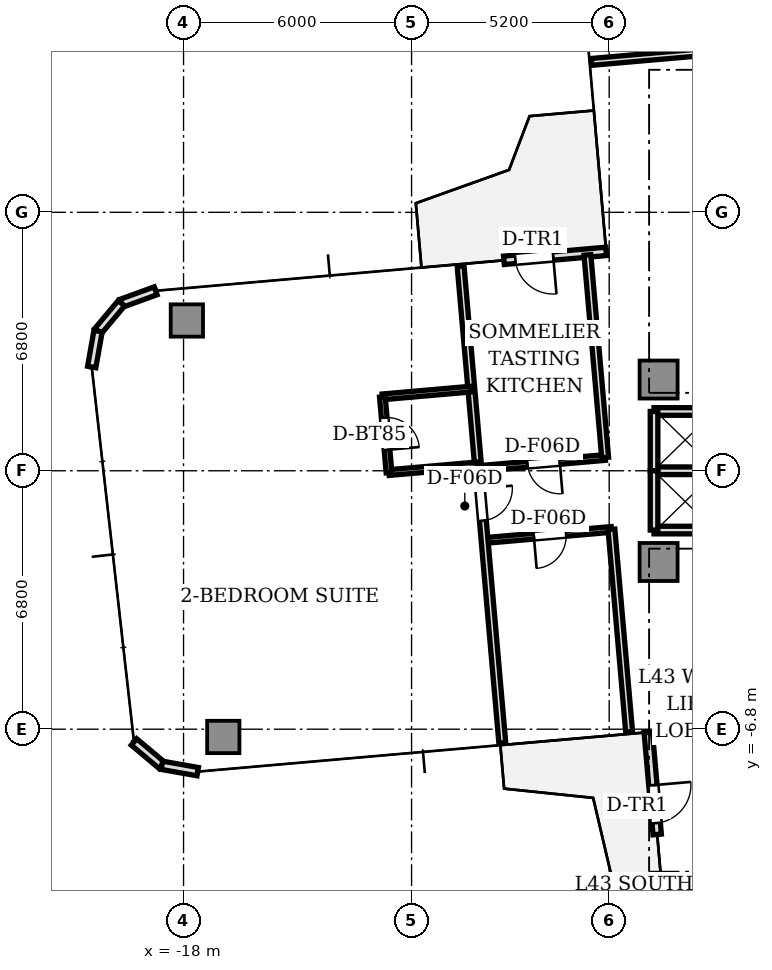
"""IFC4 building model, lengths in metres.
Left out: names, types, materials, properties, quantities, classifications, styles, units other than length and angle.
Written with IfcOpenShell. Run it as: python <this file> out.ifc"""

import sys

from ifc_helpers import new_model, si_unit, direction, frame, frame_2d, origin, origin_2d, place, context, subcontext, project, spatial, rectangle, extrude, source, transform, mapped, element, fill, save


model = new_model("IFC4")
c1 = context("Model", 3, precision=1e-05, world=origin(), true_north=direction((0.0, 1.0)))
c2 = subcontext(c1, "Body", "Model", "MODEL_VIEW")
j1 = project(units=[si_unit("LENGTHUNIT", "METRE"), si_unit("PLANEANGLEUNIT", "RADIAN")], contexts=[c1])
p1 = place(None, origin())
s1 = spatial("IfcSite", under=j1, at=p1, CompositionType="ELEMENT")
p2 = place(p1, origin())
s2 = spatial("IfcBuilding", under=s1, at=p2, CompositionType="ELEMENT")
p3 = place(p2, frame((0.0, 0.0, 157.3)))
s3 = spatial("IfcBuildingStorey", under=s2, at=p3, CompositionType="ELEMENT", Elevation=157.3)
m1 = source(origin(), c2, "Body", "SweptSolid", [
    extrude(rectangle(XDim=1.0, YDim=1.0, at=origin_2d()), origin(), (0.0, 0.0, 1.0), 3.11),
])
for number, where, z_axis, x_axis in (
    (1, (-5.5, 2.4, 0.0), (0.0, 0.0, 1.0), (1.0, 0.0, 0.0)),
    (2, (-5.5, -2.4, 0.0), (0.0, 0.0, 1.0), (1.0, 0.0, 0.0)),
):
    element("IfcColumn", number, at=place(p3, frame(where, z_axis=z_axis, x_axis=x_axis)), inside=s3, PredefinedType="COLUMN", context=c2, shape_type="MappedRepresentation", body=[
        mapped(m1, transform((0.0, 0.0, 0.0), scale=1.0)),
    ])
m2 = source(origin(), c2, "Body", "SweptSolid", [
    extrude(rectangle(XDim=0.85, YDim=0.85, at=origin_2d()), origin(), (0.0, 0.0, 1.0), 3.11),
])
for number, where, z_axis, x_axis in (
    (3, (-17.913, 3.954, 0.0), (0.0, 0.0, 1.0), (1.0, 0.0, 0.0)),
    (4, (-16.954, -7.004, 0.0), (0.0, 0.0, 1.0), (1.0, 0.0, 0.0)),
):
    element("IfcColumn", number, at=place(p3, frame(where, z_axis=z_axis, x_axis=x_axis)), inside=s3, PredefinedType="COLUMN", context=c2, shape_type="MappedRepresentation", body=[
        mapped(m2, transform((0.0, 0.0, 0.0), scale=1.0)),
    ])
p4 = place(p3, frame((-6.879, 5.772, 0.0), z_axis=(0.0, 0.0, 1.0), x_axis=(-0.996193619346, -0.087168071984, 0.0)))
e5 = element("IfcWall", 5, at=p4, inside=s3, PredefinedType="STANDARD", context=c2, shape_type="SweptSolid", body=[
    extrude(rectangle(XDim=2.7, YDim=0.22, at=frame_2d((1.35, 0.0))), origin(), (0.0, 0.0, 1.0), 3.11),
])
p5 = place(p4, frame((1.4, 0.0, 0.0)))
e6 = element("IfcOpeningElement", 6, at=p5, cuts=e5, PredefinedType="OPENING", context=c2, shape_type="SweptSolid", body=[
    extrude(rectangle(XDim=1.0, YDim=2.2, at=frame_2d((0.5, 1.1))), frame((0.0, 0.12, 0.0), z_axis=(0.0, -1.0, 0.0), x_axis=(1.0, 0.0, 0.0)), (0.0, 0.0, 1.0), 0.24),
])
p6 = place(p3, frame((-18.734, 4.735, 0.0), z_axis=(0.0, 0.0, 1.0), x_axis=(-0.939741306239, -0.34188635151, 0.0)))
e7 = element("IfcWall", 7, at=p6, inside=s3, PredefinedType="STANDARD", context=c2, shape_type="SweptSolid", body=[
    extrude(rectangle(XDim=0.958, YDim=0.22, at=frame_2d((0.479, 0.0))), origin(), (0.0, 0.0, 1.0), 3.11),
])
for number, where, z_axis, x_axis in (
    (8, (-19.634, 4.408, 0.0), (0.0, 0.0, 1.0), (-0.643, -0.766, 0.0)),
    (9, (-20.25, 3.674, 0.0), (0.0, 0.0, 1.0), (-0.174, -0.985, 0.0)),
):
    element("IfcWall", number, at=place(p3, frame(where, z_axis=z_axis, x_axis=x_axis)), inside=s3, PredefinedType="STANDARD", context=c2, shape_type="SweptSolid", body=[
        extrude(rectangle(XDim=0.958, YDim=0.22, at=frame_2d((0.479, 0.0))), origin(), (0.0, 0.0, 1.0), 3.11),
    ])
p7 = place(p3, frame((-19.304, -7.135, 0.0), z_axis=(0.0, 0.0, 1.0), x_axis=(0.766001159887, -0.642839189107, 0.0)))
e10 = element("IfcWall", 10, at=p7, inside=s3, PredefinedType="STANDARD", context=c2, shape_type="SweptSolid", body=[
    extrude(rectangle(XDim=0.958, YDim=0.22, at=frame_2d((0.479, 0.0))), origin(), (0.0, 0.0, 1.0), 3.11),
])
p8 = place(p3, frame((-18.57, -7.75, 0.0), z_axis=(0.0, 0.0, 1.0), x_axis=(0.984770724397, -0.173858046606, 0.0)))
e11 = element("IfcWall", 11, at=p8, inside=s3, PredefinedType="STANDARD", context=c2, shape_type="SweptSolid", body=[
    extrude(rectangle(XDim=0.958, YDim=0.22, at=frame_2d((0.479, 0.0))), origin(), (0.0, 0.0, 1.0), 3.11),
])
p9 = place(p3, frame((-5.772, -6.879, 0.0), z_axis=(0.0, 0.0, 1.0), x_axis=(0.087168071984, -0.996193619346, 0.0)))
e12 = element("IfcWall", 12, at=p9, inside=s3, PredefinedType="STANDARD", context=c2, shape_type="SweptSolid", body=[
    extrude(rectangle(XDim=2.7, YDim=0.22, at=frame_2d((1.35, 0.0))), origin(), (0.0, 0.0, 1.0), 3.11),
])
p10 = place(p9, frame((1.4, 0.0, 0.0)))
e13 = element("IfcOpeningElement", 13, at=p10, cuts=e12, PredefinedType="OPENING", context=c2, shape_type="SweptSolid", body=[
    extrude(rectangle(XDim=1.0, YDim=2.2, at=frame_2d((0.5, 1.1))), frame((0.0, 0.12, 0.0), z_axis=(0.0, -1.0, 0.0), x_axis=(1.0, 0.0, 0.0)), (0.0, 0.0, 1.0), 0.24),
])
for number, where, z_axis, x_axis in (
    (14, (-5.62, 1.56, 0.0), (0.0, 0.0, 1.0), (1.0, 0.0, 0.0)),
    (15, (-5.62, -1.56, 0.0), (0.0, 0.0, 1.0), (1.0, 0.0, 0.0)),
    (16, (-5.62, 0.0, 0.0), (0.0, 0.0, 1.0), (1.0, 0.0, 0.0)),
):
    element("IfcWall", number, at=place(p3, frame(where, z_axis=z_axis, x_axis=x_axis)), inside=s3, PredefinedType="SOLIDWALL", context=c2, shape_type="SweptSolid", body=[
        extrude(rectangle(XDim=1.64, YDim=0.2, at=frame_2d((0.82, 0.0))), origin(), (0.0, 0.0, 1.0), 2.66),
    ])
for number, where, z_axis, x_axis in (
    (17, (-5.62, 0.0, 0.0), (0.0, 0.0, 1.0), (0.0, 1.0, 0.0)),
    (18, (-5.62, -1.56, 0.0), (0.0, 0.0, 1.0), (0.0, 1.0, 0.0)),
):
    element("IfcWall", number, at=place(p3, frame(where, z_axis=z_axis, x_axis=x_axis)), inside=s3, PredefinedType="SOLIDWALL", context=c2, shape_type="SweptSolid", body=[
        extrude(rectangle(XDim=1.56, YDim=0.2, at=frame_2d((0.78, 0.0))), origin(), (0.0, 0.0, 1.0), 2.66),
    ])
p11 = place(p3, frame((-1.936, 11.224, 0.0), z_axis=(0.0, 0.0, 1.0), x_axis=(-0.996194212812, -0.087161289348, 0.0)))
e19 = element("IfcWall", 19, at=p11, inside=s3, PredefinedType="PARTITIONING", context=c2, shape_type="SweptSolid", body=[
    extrude(rectangle(XDim=5.35, YDim=0.18, at=frame_2d((2.675, 0.0))), origin(), (0.0, 0.0, 1.0), 2.66),
])
p12 = place(p3, frame((-6.741, -1.543, 0.0), z_axis=(0.0, 0.0, 1.0), x_axis=(-0.996193954812, -0.087164238054, 0.0)))
e20 = element("IfcWall", 20, at=p12, inside=s3, PredefinedType="PARTITIONING", context=c2, shape_type="SweptSolid", body=[
    extrude(rectangle(XDim=3.35, YDim=0.15, at=frame_2d((1.675, 0.0))), origin(), (0.0, 0.0, 1.0), 2.66),
])
p13 = place(p12, frame((1.2, 0.0, 0.0)))
e21 = element("IfcOpeningElement", 21, at=p13, cuts=e20, PredefinedType="OPENING", context=c2, shape_type="SweptSolid", body=[
    extrude(rectangle(XDim=0.85, YDim=2.1, at=frame_2d((0.425, 1.05))), frame((0.0, 0.085, 0.0), z_axis=(0.0, -1.0, 0.0), x_axis=(1.0, 0.0, 0.0)), (0.0, 0.0, 1.0), 0.17),
])
p14 = place(p3, frame((-6.907, 0.349, 0.0), z_axis=(0.0, 0.0, 1.0), x_axis=(-0.996193954812, -0.087164238054, 0.0)))
e22 = element("IfcWall", 22, at=p14, inside=s3, PredefinedType="PARTITIONING", context=c2, shape_type="SweptSolid", body=[
    extrude(rectangle(XDim=3.35, YDim=0.15, at=frame_2d((1.675, 0.0))), origin(), (0.0, 0.0, 1.0), 2.66),
])
p15 = place(p14, frame((1.2, 0.0, 0.0)))
e23 = element("IfcOpeningElement", 23, at=p15, cuts=e22, PredefinedType="OPENING", context=c2, shape_type="SweptSolid", body=[
    extrude(rectangle(XDim=0.85, YDim=2.1, at=frame_2d((0.425, 1.05))), frame((0.0, 0.085, 0.0), z_axis=(0.0, -1.0, 0.0), x_axis=(1.0, 0.0, 0.0)), (0.0, 0.0, 1.0), 0.17),
])
for number, where, z_axis, x_axis in (
    (24, (-6.741, -1.543, 0.0), (0.0, 0.0, 1.0), (0.087, -0.996, 0.0)),
    (25, (-7.373, 5.679, 0.0), (0.0, 0.0, 1.0), (0.087, -0.996, 0.0)),
):
    element("IfcWall", number, at=place(p3, frame(where, z_axis=z_axis, x_axis=x_axis)), inside=s3, PredefinedType="PARTITIONING", context=c2, shape_type="SweptSolid", body=[
        extrude(rectangle(XDim=5.35, YDim=0.18, at=frame_2d((2.675, 0.0))), origin(), (0.0, 0.0, 1.0), 2.66),
    ])
p16 = place(p3, frame((-10.71, 5.387, 0.0), z_axis=(0.0, 0.0, 1.0), x_axis=(0.087154691724, -0.996194790044, 0.0)))
e26 = element("IfcWall", 26, at=p16, inside=s3, PredefinedType="PARTITIONING", context=c2, shape_type="SweptSolid", body=[
    extrude(rectangle(XDim=12.6, YDim=0.18, at=frame_2d((6.3, 0.0))), origin(), (0.0, 0.0, 1.0), 2.66),
])
p17 = place(p16, frame((5.875, 0.0, 0.0)))
e27 = element("IfcOpeningElement", 27, at=p17, cuts=e26, PredefinedType="OPENING", context=c2, shape_type="SweptSolid", body=[
    extrude(rectangle(XDim=0.85, YDim=2.1, at=frame_2d((0.425, 1.05))), frame((0.0, 0.1, 0.0), z_axis=(0.0, -1.0, 0.0), x_axis=(1.0, 0.0, 0.0)), (0.0, 0.0, 1.0), 0.2),
])
for number, where, z_axis, x_axis in (
    (28, (-10.253, 0.157, 0.0), (0.0, 0.0, 1.0), (-0.996, -0.087, 0.0)),
    (29, (-10.427, 2.149, 0.0), (0.0, 0.0, 1.0), (-0.996, -0.087, 0.0)),
):
    element("IfcWall", number, at=place(p3, frame(where, z_axis=z_axis, x_axis=x_axis)), inside=s3, PredefinedType="PARTITIONING", context=c2, shape_type="SweptSolid", body=[
        extrude(rectangle(XDim=2.35, YDim=0.15, at=frame_2d((1.175, 0.0))), origin(), (0.0, 0.0, 1.0), 2.66),
    ])
p18 = place(p3, frame((-12.768, 1.945, 0.0), z_axis=(0.0, 0.0, 1.0), x_axis=(0.087156350505, -0.99619464492, 0.0)))
e30 = element("IfcWall", 30, at=p18, inside=s3, PredefinedType="PARTITIONING", context=c2, shape_type="SweptSolid", body=[
    extrude(rectangle(XDim=2.0, YDim=0.15, at=frame_2d((1.0, 0.0))), origin(), (0.0, 0.0, 1.0), 2.66),
])
p19 = place(p18, frame((0.55, 0.0, 0.0)))
e31 = element("IfcOpeningElement", 31, at=p19, cuts=e30, PredefinedType="OPENING", context=c2, shape_type="SweptSolid", body=[
    extrude(rectangle(XDim=0.85, YDim=2.1, at=frame_2d((0.425, 1.05))), frame((0.0, 0.085, 0.0), z_axis=(0.0, -1.0, 0.0), x_axis=(1.0, 0.0, 0.0)), (0.0, 0.0, 1.0), 0.17),
])
m3 = source(origin(), c2, "Body", "SweptSolid", [
    extrude(rectangle(XDim=1.0, YDim=0.05, at=origin_2d()), origin(), (0.0, 0.0, 1.0), 2.2),
])
p20 = place(p5, frame((0.5, 0.0, 0.0)))
e32 = element("IfcDoor", 32, at=p20, inside=s3, OperationType="SINGLE_SWING_LEFT", PredefinedType="DOOR", context=c2, shape_type="MappedRepresentation", body=[
    mapped(m3, transform((0.0, 0.0, 0.0), scale=1.0)),
])
fill(e6, e32)
p21 = place(p10, frame((0.5, 0.0, 0.0)))
e33 = element("IfcDoor", 33, at=p21, inside=s3, OperationType="SINGLE_SWING_LEFT", PredefinedType="DOOR", context=c2, shape_type="MappedRepresentation", body=[
    mapped(m3, transform((0.0, 0.0, 0.0), scale=1.0)),
])
fill(e13, e33)
m4 = source(origin(), c2, "Body", "SweptSolid", [
    extrude(rectangle(XDim=0.85, YDim=0.05, at=origin_2d()), origin(), (0.0, 0.0, 1.0), 2.1),
])
p22 = place(p13, frame((0.425, 0.0, 0.0)))
e34 = element("IfcDoor", 34, at=p22, inside=s3, OperationType="SINGLE_SWING_RIGHT", PredefinedType="DOOR", context=c2, shape_type="MappedRepresentation", body=[
    mapped(m4, transform((0.0, 0.0, 0.0), scale=1.0)),
])
fill(e21, e34)
p23 = place(p15, frame((0.425, 0.0, 0.0)))
e35 = element("IfcDoor", 35, at=p23, inside=s3, OperationType="SINGLE_SWING_LEFT", PredefinedType="DOOR", context=c2, shape_type="MappedRepresentation", body=[
    mapped(m4, transform((0.0, 0.0, 0.0), scale=1.0)),
])
fill(e23, e35)
p24 = place(p19, frame((0.425, 0.0, 0.0)))
e36 = element("IfcDoor", 36, at=p24, inside=s3, OperationType="SINGLE_SWING_RIGHT", PredefinedType="DOOR", context=c2, shape_type="MappedRepresentation", body=[
    mapped(m4, transform((0.0, 0.0, 0.0), scale=1.0)),
])
fill(e31, e36)
p25 = place(p17, frame((0.425, 0.0, 0.0)))
e37 = element("IfcDoor", 37, at=p25, inside=s3, OperationType="SINGLE_SWING_LEFT", PredefinedType="DOOR", context=c2, shape_type="MappedRepresentation", body=[
    mapped(m4, transform((0.0, 0.0, 0.0), scale=1.0)),
])
fill(e27, e37)
save(model, sys.argv[1])
